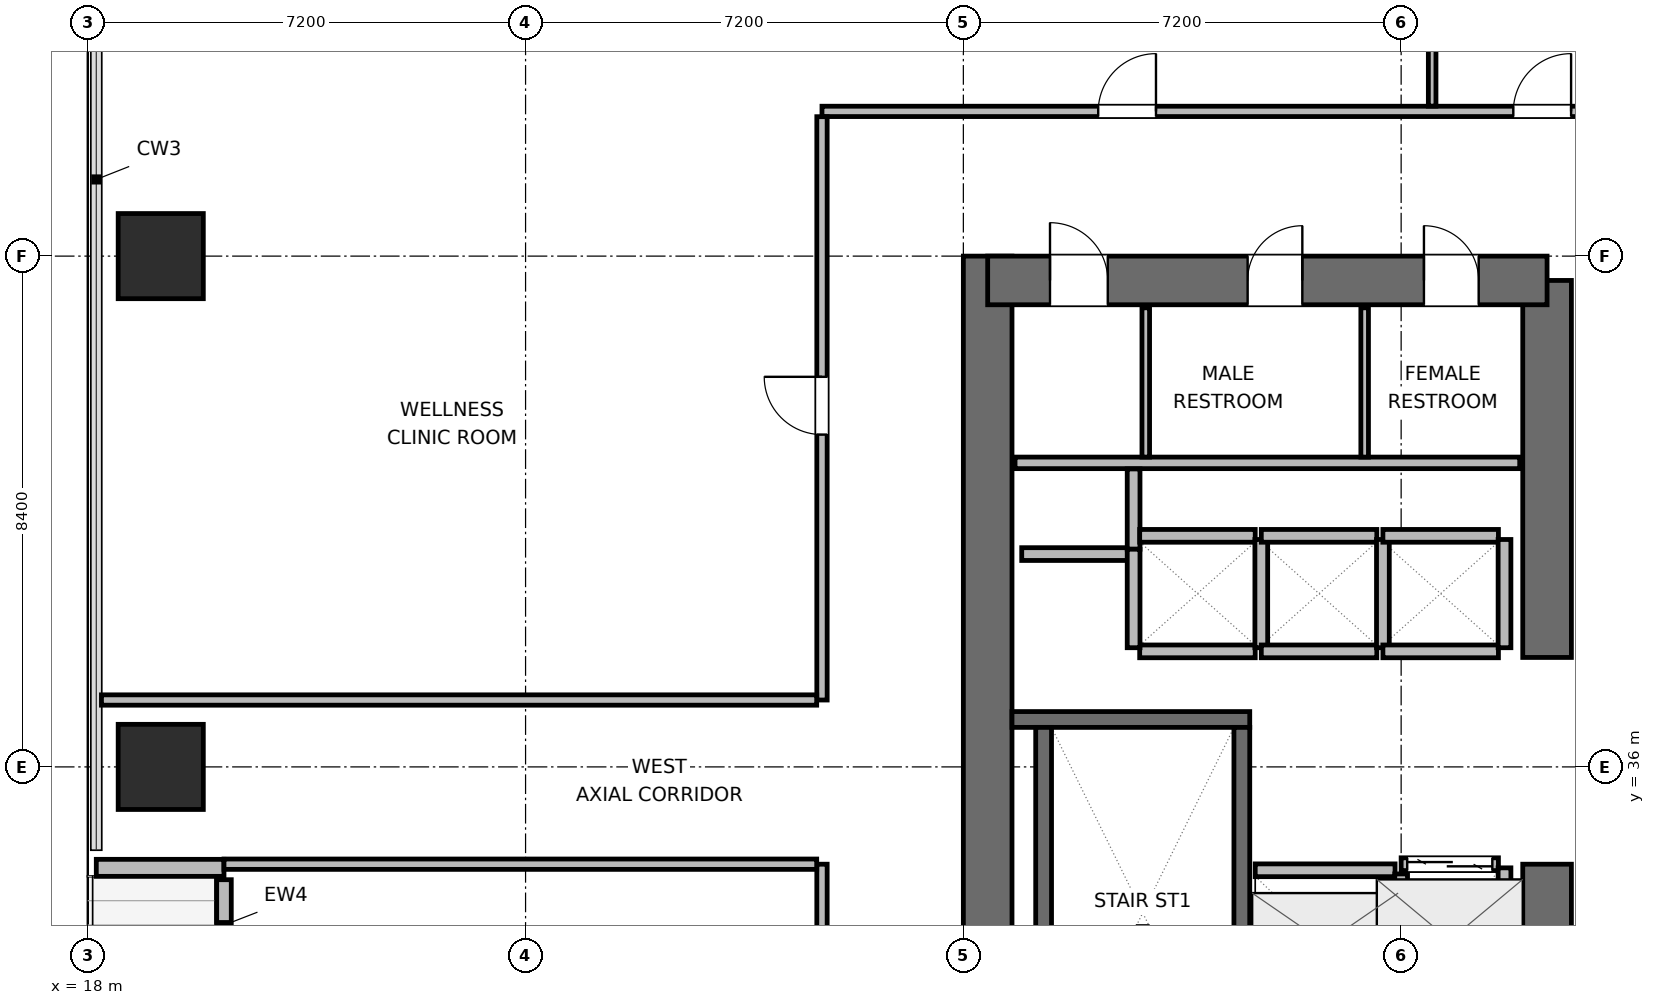
"""IFC4 building model, lengths in metres.
Left out: names, types, materials, properties, quantities, classifications, styles, units other than length and angle.
Written with IfcOpenShell. Run it as: python <this file> out.ifc"""

import sys

from ifc_helpers import new_model, si_unit, direction, frame, frame_2d, origin, origin_2d, place, context, subcontext, project, spatial, rectangle, extrude, element, fill, save


model = new_model("IFC4")
c1 = context("Model", 3, precision=1e-05, world=origin(), true_north=direction((0.0, 1.0)))
c2 = subcontext(c1, "Body", "Model", "MODEL_VIEW")
j1 = project(units=[si_unit("LENGTHUNIT", "METRE"), si_unit("PLANEANGLEUNIT", "RADIAN")], contexts=[c1])
p1 = place(None, origin())
s1 = spatial("IfcSite", under=j1, at=p1, CompositionType="ELEMENT")
p2 = place(p1, origin())
s2 = spatial("IfcBuilding", under=s1, at=p2, CompositionType="ELEMENT")
p3 = place(p2, frame((0.0, 0.0, 150.6)))
s3 = spatial("IfcBuildingStorey", under=s2, at=p3, CompositionType="ELEMENT", Elevation=150.6)
p4 = place(p3, frame((32.8, 27.6, 0.0), z_axis=(0.0, 0.0, 1.0), x_axis=(0.0, 1.0, 0.0)))
e1 = element("IfcWall", 1, at=p4, inside=s3, PredefinedType="SHEAR", context=c2, shape_type="SweptSolid", body=[
    extrude(rectangle(XDim=16.8, YDim=0.8, at=frame_2d((8.4, 0.0))), origin(), (0.0, 0.0, 1.0), 3.9),
])
p5 = place(p3, frame((42.0, 28.0, 0.0), z_axis=(0.0, 0.0, 1.0), x_axis=(0.0, 1.0, 0.0)))
e2 = element("IfcWall", 2, at=p5, inside=s3, PredefinedType="SHEAR", context=c2, shape_type="SweptSolid", body=[
    extrude(rectangle(XDim=6.4, YDim=0.8, at=frame_2d((3.2, 0.0))), origin(), (0.0, 0.0, 1.0), 3.9),
])
p6 = place(p3, frame((42.0, 37.8, 0.0), z_axis=(0.0, 0.0, 1.0), x_axis=(0.0, 1.0, 0.0)))
e3 = element("IfcWall", 3, at=p6, inside=s3, PredefinedType="SHEAR", context=c2, shape_type="SweptSolid", body=[
    extrude(rectangle(XDim=6.2, YDim=0.8, at=frame_2d((3.1, 0.0))), origin(), (0.0, 0.0, 1.0), 3.9),
])
p7 = place(p3, frame((32.8, 44.0, 0.0), z_axis=(0.0, 0.0, 1.0), x_axis=(1.0, 0.0, 0.0)))
e4 = element("IfcWall", 4, at=p7, inside=s3, PredefinedType="SHEAR", context=c2, shape_type="SweptSolid", body=[
    extrude(rectangle(XDim=9.2, YDim=0.8, at=frame_2d((4.6, 0.0))), origin(), (0.0, 0.0, 1.0), 3.9),
])
p8 = place(p7, frame((1.025, 0.0, 0.0)))
e5 = element("IfcOpeningElement", 5, at=p8, cuts=e4, PredefinedType="OPENING", context=c2, shape_type="SweptSolid", body=[
    extrude(rectangle(XDim=0.95, YDim=2.04, at=frame_2d((0.475, 1.02))), frame((0.0, 0.41, 0.0), z_axis=(0.0, -1.0, 0.0), x_axis=(1.0, 0.0, 0.0)), (0.0, 0.0, 1.0), 0.82),
])
p9 = place(p7, frame((4.275, 0.0, 0.0)))
e6 = element("IfcOpeningElement", 6, at=p9, cuts=e4, PredefinedType="OPENING", context=c2, shape_type="SweptSolid", body=[
    extrude(rectangle(XDim=0.9, YDim=2.02, at=frame_2d((0.45, 1.01))), frame((0.0, 0.41, 0.0), z_axis=(0.0, -1.0, 0.0), x_axis=(1.0, 0.0, 0.0)), (0.0, 0.0, 1.0), 0.82),
])
p10 = place(p7, frame((7.175, 0.0, 0.0)))
e7 = element("IfcOpeningElement", 7, at=p10, cuts=e4, PredefinedType="OPENING", context=c2, shape_type="SweptSolid", body=[
    extrude(rectangle(XDim=0.9, YDim=2.02, at=frame_2d((0.45, 1.01))), frame((0.0, 0.41, 0.0), z_axis=(0.0, -1.0, 0.0), x_axis=(1.0, 0.0, 0.0)), (0.0, 0.0, 1.0), 0.82),
])
p11 = place(p3, frame((33.2, 36.78, 0.0), z_axis=(0.0, 0.0, 1.0), x_axis=(1.0, 0.0, 0.0)))
e8 = element("IfcWall", 8, at=p11, inside=s3, PredefinedType="SHEAR", context=c2, shape_type="SweptSolid", body=[
    extrude(rectangle(XDim=3.91, YDim=0.26, at=frame_2d((1.955, 0.0))), origin(), (0.0, 0.0, 1.0), 3.9),
])
p12 = place(p3, frame((33.72, 29.05, 0.0), z_axis=(0.0, 0.0, 1.0), x_axis=(0.0, 1.0, 0.0)))
e9 = element("IfcWall", 9, at=p12, inside=s3, PredefinedType="SHEAR", context=c2, shape_type="SweptSolid", body=[
    extrude(rectangle(XDim=7.6, YDim=0.26, at=frame_2d((3.8, 0.0))), origin(), (0.0, 0.0, 1.0), 3.9),
])
p13 = place(p3, frame((36.98, 29.05, 0.0), z_axis=(0.0, 0.0, 1.0), x_axis=(0.0, 1.0, 0.0)))
e10 = element("IfcWall", 10, at=p13, inside=s3, PredefinedType="SHEAR", context=c2, shape_type="SweptSolid", body=[
    extrude(rectangle(XDim=7.6, YDim=0.26, at=frame_2d((3.8, 0.0))), origin(), (0.0, 0.0, 1.0), 3.9),
])
p14 = place(p13, frame((0.3, 0.0, 0.0)))
e11 = element("IfcOpeningElement", 11, at=p14, cuts=e10, PredefinedType="OPENING", context=c2, shape_type="SweptSolid", body=[
    extrude(rectangle(XDim=1.0, YDim=2.04, at=frame_2d((0.5, 1.02))), frame((0.0, 0.14, 0.0), z_axis=(0.0, -1.0, 0.0), x_axis=(1.0, 0.0, 0.0)), (0.0, 0.0, 1.0), 0.28),
])
for number, where, z_axis, x_axis in (
    (12, (19.2, 36.0, 0.0), (0.0, 0.0, 1.0), (1.0, 0.0, 0.0)),
    (13, (19.2, 44.4, 0.0), (0.0, 0.0, 1.0), (1.0, 0.0, 0.0)),
):
    element("IfcColumn", number, at=place(p3, frame(where, z_axis=z_axis, x_axis=x_axis)), inside=s3, PredefinedType="COLUMN", context=c2, shape_type="SweptSolid", body=[
        extrude(rectangle(XDim=1.4, YDim=1.4, at=origin_2d()), origin(), (0.0, 0.0, 1.0), 3.9),
    ])
p15 = place(p3, frame((20.24, 29.455, 0.0), z_axis=(0.0, 0.0, 1.0), x_axis=(0.0, 1.0, 0.0)))
e14 = element("IfcWall", 14, at=p15, inside=s3, PredefinedType="SOLIDWALL", context=c2, shape_type="SweptSolid", body=[
    extrude(rectangle(XDim=4.69, YDim=0.24, at=frame_2d((2.345, 0.0))), origin(), (0.0, 0.0, 1.0), 3.248),
])
p16 = place(p15, frame((1.845, 0.0, 0.0)))
e15 = element("IfcOpeningElement", 15, at=p16, cuts=e14, PredefinedType="OPENING", context=c2, shape_type="SweptSolid", body=[
    extrude(rectangle(XDim=1.0, YDim=2.02, at=frame_2d((0.5, 1.01))), frame((0.0, 0.13, 0.0), z_axis=(0.0, -1.0, 0.0), x_axis=(1.0, 0.0, 0.0)), (0.0, 0.0, 1.0), 0.26),
])
p17 = place(p3, frame((20.24, 34.34, 0.0), z_axis=(0.0, 0.0, 1.0), x_axis=(-1.0, 0.0, 0.0)))
e16 = element("IfcWall", 16, at=p17, inside=s3, PredefinedType="SOLIDWALL", context=c2, shape_type="SweptSolid", body=[
    extrude(rectangle(XDim=2.1, YDim=0.28, at=frame_2d((1.05, 0.0))), origin(), (0.0, 0.0, 1.0), 3.116),
])
p18 = place(p3, frame((33.25, 41.0, 0.0), z_axis=(0.0, 0.0, 1.0), x_axis=(1.0, 0.0, 0.0)))
e17 = element("IfcWall", 17, at=p18, inside=s3, PredefinedType="PLUMBINGWALL", context=c2, shape_type="SweptSolid", body=[
    extrude(rectangle(XDim=8.3, YDim=0.19, at=frame_2d((4.15, 0.0))), origin(), (0.0, 0.0, 1.0), 3.68),
])
for number, where, z_axis, x_axis in (
    (18, (35.4, 41.095, 0.0), (0.0, 0.0, 1.0), (0.0, 1.0, 0.0)),
    (19, (39.0, 41.095, 0.0), (0.0, 0.0, 1.0), (0.0, 1.0, 0.0)),
):
    element("IfcWall", number, at=place(p3, frame(where, z_axis=z_axis, x_axis=x_axis)), inside=s3, PredefinedType="PARTITIONING", context=c2, shape_type="SweptSolid", body=[
        extrude(rectangle(XDim=2.455, YDim=0.125, at=frame_2d((1.228, 0.0))), origin(), (0.0, 0.0, 1.0), 3.68),
    ])
p19 = place(p3, frame((33.36, 39.5, 0.0), z_axis=(0.0, 0.0, 1.0), x_axis=(1.0, 0.0, 0.0)))
e20 = element("IfcWall", 20, at=p19, inside=s3, PredefinedType="PARTITIONING", context=c2, shape_type="SweptSolid", body=[
    extrude(rectangle(XDim=1.86, YDim=0.21, at=frame_2d((0.93, 0.0))), origin(), (0.0, 0.0, 1.0), 3.68),
])
p20 = place(p3, frame((35.2, 39.58, 0.0), z_axis=(0.0, 0.0, 1.0), x_axis=(0.0, 1.0, 0.0)))
e21 = element("IfcWall", 21, at=p20, inside=s3, PredefinedType="PARTITIONING", context=c2, shape_type="SweptSolid", body=[
    extrude(rectangle(XDim=1.32, YDim=0.21, at=frame_2d((0.66, 0.0))), origin(), (0.0, 0.0, 1.0), 3.68),
])
p21 = place(p3, frame((37.2, 34.3, 0.0), z_axis=(0.0, 0.0, 1.0), x_axis=(1.0, 0.0, 0.0)))
e22 = element("IfcWall", 22, at=p21, inside=s3, PredefinedType="PARTITIONING", context=c2, shape_type="SweptSolid", body=[
    extrude(rectangle(XDim=2.3, YDim=0.21, at=frame_2d((1.15, 0.0))), origin(), (0.0, 0.0, 1.0), 3.68),
])
p22 = place(p3, frame((39.6, 31.96, 0.0), z_axis=(0.0, 0.0, 1.0), x_axis=(0.0, 1.0, 0.0)))
e23 = element("IfcWall", 23, at=p22, inside=s3, PredefinedType="PARTITIONING", context=c2, shape_type="SweptSolid", body=[
    extrude(rectangle(XDim=2.28, YDim=0.21, at=frame_2d((1.14, 0.0))), origin(), (0.0, 0.0, 1.0), 3.68),
])
p23 = place(p3, frame((39.6, 34.4, 0.0), z_axis=(0.0, 0.0, 1.0), x_axis=(1.0, 0.0, 0.0)))
e24 = element("IfcWall", 24, at=p23, inside=s3, PredefinedType="PARTITIONING", context=c2, shape_type="SweptSolid", body=[
    extrude(rectangle(XDim=1.6, YDim=0.21, at=frame_2d((0.8, 0.0))), origin(), (0.0, 0.0, 1.0), 3.68),
])
p24 = place(p23, frame((0.1, 0.0, 0.0)))
e25 = element("IfcOpeningElement", 25, at=p24, cuts=e24, PredefinedType="OPENING", context=c2, shape_type="SweptSolid", body=[
    extrude(rectangle(XDim=1.4, YDim=2.06, at=frame_2d((0.7, 1.03))), frame((0.0, 0.115, 0.0), z_axis=(0.0, -1.0, 0.0), x_axis=(1.0, 0.0, 0.0)), (0.0, 0.0, 1.0), 0.23),
])
p25 = place(p3, frame((41.3, 31.96, 0.0), z_axis=(0.0, 0.0, 1.0), x_axis=(0.0, 1.0, 0.0)))
e26 = element("IfcWall", 26, at=p25, inside=s3, PredefinedType="PARTITIONING", context=c2, shape_type="SweptSolid", body=[
    extrude(rectangle(XDim=2.38, YDim=0.21, at=frame_2d((1.19, 0.0))), origin(), (0.0, 0.0, 1.0), 3.68),
])
for number, where, z_axis, x_axis in (
    (27, (35.3, 37.9, 0.0), (0.0, 0.0, 1.0), (1.0, 0.0, 0.0)),
    (28, (35.3, 39.8, 0.0), (0.0, 0.0, 1.0), (1.0, 0.0, 0.0)),
):
    element("IfcWall", number, at=place(p3, frame(where, z_axis=z_axis, x_axis=x_axis)), inside=s3, PredefinedType="PARTITIONING", context=c2, shape_type="SweptSolid", body=[
        extrude(rectangle(XDim=1.9, YDim=0.21, at=frame_2d((0.95, 0.0))), origin(), (0.0, 0.0, 1.0), 3.68),
    ])
p26 = place(p3, frame((35.2, 37.96, 0.0), z_axis=(0.0, 0.0, 1.0), x_axis=(0.0, 1.0, 0.0)))
e29 = element("IfcWall", 29, at=p26, inside=s3, PredefinedType="PARTITIONING", context=c2, shape_type="SweptSolid", body=[
    extrude(rectangle(XDim=1.62, YDim=0.21, at=frame_2d((0.81, 0.0))), origin(), (0.0, 0.0, 1.0), 3.68),
])
p27 = place(p3, frame((37.3, 37.96, 0.0), z_axis=(0.0, 0.0, 1.0), x_axis=(0.0, 1.0, 0.0)))
e30 = element("IfcWall", 30, at=p27, inside=s3, PredefinedType="PARTITIONING", context=c2, shape_type="SweptSolid", body=[
    extrude(rectangle(XDim=1.78, YDim=0.21, at=frame_2d((0.89, 0.0))), origin(), (0.0, 0.0, 1.0), 3.68),
])
for number, where, z_axis, x_axis in (
    (31, (37.3, 37.9, 0.0), (0.0, 0.0, 1.0), (1.0, 0.0, 0.0)),
    (32, (37.3, 39.8, 0.0), (0.0, 0.0, 1.0), (1.0, 0.0, 0.0)),
):
    element("IfcWall", number, at=place(p3, frame(where, z_axis=z_axis, x_axis=x_axis)), inside=s3, PredefinedType="PARTITIONING", context=c2, shape_type="SweptSolid", body=[
        extrude(rectangle(XDim=1.9, YDim=0.21, at=frame_2d((0.95, 0.0))), origin(), (0.0, 0.0, 1.0), 3.68),
    ])
p28 = place(p3, frame((39.3, 37.96, 0.0), z_axis=(0.0, 0.0, 1.0), x_axis=(0.0, 1.0, 0.0)))
e33 = element("IfcWall", 33, at=p28, inside=s3, PredefinedType="PARTITIONING", context=c2, shape_type="SweptSolid", body=[
    extrude(rectangle(XDim=1.78, YDim=0.21, at=frame_2d((0.89, 0.0))), origin(), (0.0, 0.0, 1.0), 3.68),
])
for number, where, z_axis, x_axis in (
    (34, (39.3, 37.9, 0.0), (0.0, 0.0, 1.0), (1.0, 0.0, 0.0)),
    (35, (39.3, 39.8, 0.0), (0.0, 0.0, 1.0), (1.0, 0.0, 0.0)),
):
    element("IfcWall", number, at=place(p3, frame(where, z_axis=z_axis, x_axis=x_axis)), inside=s3, PredefinedType="PARTITIONING", context=c2, shape_type="SweptSolid", body=[
        extrude(rectangle(XDim=1.9, YDim=0.21, at=frame_2d((0.95, 0.0))), origin(), (0.0, 0.0, 1.0), 3.68),
    ])
p29 = place(p3, frame((41.3, 37.96, 0.0), z_axis=(0.0, 0.0, 1.0), x_axis=(0.0, 1.0, 0.0)))
e36 = element("IfcWall", 36, at=p29, inside=s3, PredefinedType="PARTITIONING", context=c2, shape_type="SweptSolid", body=[
    extrude(rectangle(XDim=1.78, YDim=0.21, at=frame_2d((0.89, 0.0))), origin(), (0.0, 0.0, 1.0), 3.68),
])
p30 = place(p3, frame((30.075, 46.78, 0.0), z_axis=(0.0, 0.0, 1.0), x_axis=(1.0, 0.0, 0.0)))
e37 = element("IfcWall", 37, at=p30, inside=s3, PredefinedType="PARTITIONING", context=c2, shape_type="SweptSolid", body=[
    extrude(rectangle(XDim=33.525, YDim=0.17, at=frame_2d((16.763, 0.0))), origin(), (0.0, 0.0, 1.0), 3.68),
])
p31 = place(p30, frame((4.543, 0.0, 0.0)))
e38 = element("IfcOpeningElement", 38, at=p31, cuts=e37, PredefinedType="OPENING", context=c2, shape_type="SweptSolid", body=[
    extrude(rectangle(XDim=0.95, YDim=2.04, at=frame_2d((0.475, 1.02))), frame((0.0, 0.095, 0.0), z_axis=(0.0, -1.0, 0.0), x_axis=(1.0, 0.0, 0.0)), (0.0, 0.0, 1.0), 0.19),
])
p32 = place(p30, frame((11.37, 0.0, 0.0)))
e39 = element("IfcOpeningElement", 39, at=p32, cuts=e37, PredefinedType="OPENING", context=c2, shape_type="SweptSolid", body=[
    extrude(rectangle(XDim=0.95, YDim=2.04, at=frame_2d((0.475, 1.02))), frame((0.0, 0.095, 0.0), z_axis=(0.0, -1.0, 0.0), x_axis=(1.0, 0.0, 0.0)), (0.0, 0.0, 1.0), 0.19),
])
p33 = place(p30, frame((18.905, 0.0, 0.0)))
e40 = element("IfcOpeningElement", 40, at=p33, cuts=e37, PredefinedType="OPENING", context=c2, shape_type="SweptSolid", body=[
    extrude(rectangle(XDim=0.95, YDim=2.04, at=frame_2d((0.475, 1.02))), frame((0.0, 0.095, 0.0), z_axis=(0.0, -1.0, 0.0), x_axis=(1.0, 0.0, 0.0)), (0.0, 0.0, 1.0), 0.19),
])
p34 = place(p30, frame((27.74, 0.0, 0.0)))
e41 = element("IfcOpeningElement", 41, at=p34, cuts=e37, PredefinedType="OPENING", context=c2, shape_type="SweptSolid", body=[
    extrude(rectangle(XDim=0.95, YDim=2.04, at=frame_2d((0.475, 1.02))), frame((0.0, 0.095, 0.0), z_axis=(0.0, -1.0, 0.0), x_axis=(1.0, 0.0, 0.0)), (0.0, 0.0, 1.0), 0.19),
])
p35 = place(p30, frame((31.95, 0.0, 0.0)))
e42 = element("IfcOpeningElement", 42, at=p35, cuts=e37, PredefinedType="OPENING", context=c2, shape_type="SweptSolid", body=[
    extrude(rectangle(XDim=0.95, YDim=2.04, at=frame_2d((0.475, 1.02))), frame((0.0, 0.095, 0.0), z_axis=(0.0, -1.0, 0.0), x_axis=(1.0, 0.0, 0.0)), (0.0, 0.0, 1.0), 0.19),
])
p36 = place(p3, frame((30.075, 25.307, 0.0), z_axis=(0.0, 0.0, 1.0), x_axis=(0.0, 1.0, 0.0)))
e43 = element("IfcWall", 43, at=p36, inside=s3, PredefinedType="PARTITIONING", context=c2, shape_type="SweptSolid", body=[
    extrude(rectangle(XDim=9.093, YDim=0.17, at=frame_2d((4.546, 0.0))), origin(), (0.0, 0.0, 1.0), 3.68),
])
p37 = place(p36, frame((4.028, 0.0, 0.0)))
e44 = element("IfcOpeningElement", 44, at=p37, cuts=e43, PredefinedType="OPENING", context=c2, shape_type="SweptSolid", body=[
    extrude(rectangle(XDim=0.95, YDim=2.04, at=frame_2d((0.475, 1.02))), frame((0.0, 0.095, 0.0), z_axis=(0.0, -1.0, 0.0), x_axis=(1.0, 0.0, 0.0)), (0.0, 0.0, 1.0), 0.19),
])
p38 = place(p3, frame((30.075, 37.1, 0.0), z_axis=(0.0, 0.0, 1.0), x_axis=(0.0, 1.0, 0.0)))
e45 = element("IfcWall", 45, at=p38, inside=s3, PredefinedType="PARTITIONING", context=c2, shape_type="SweptSolid", body=[
    extrude(rectangle(XDim=9.593, YDim=0.17, at=frame_2d((4.796, 0.0))), origin(), (0.0, 0.0, 1.0), 3.68),
])
p39 = place(p38, frame((4.365, 0.0, 0.0)))
e46 = element("IfcOpeningElement", 46, at=p39, cuts=e45, PredefinedType="OPENING", context=c2, shape_type="SweptSolid", body=[
    extrude(rectangle(XDim=0.95, YDim=2.04, at=frame_2d((0.475, 1.02))), frame((0.0, 0.095, 0.0), z_axis=(0.0, -1.0, 0.0), x_axis=(1.0, 0.0, 0.0)), (0.0, 0.0, 1.0), 0.19),
])
p40 = place(p3, frame((40.11, 46.867, 0.0), z_axis=(0.0, 0.0, 1.0), x_axis=(0.0, 1.0, 0.0)))
e47 = element("IfcWall", 47, at=p40, inside=s3, PredefinedType="PARTITIONING", context=c2, shape_type="SweptSolid", body=[
    extrude(rectangle(XDim=15.298, YDim=0.125, at=frame_2d((7.649, 0.0))), origin(), (0.0, 0.0, 1.0), 3.043),
])
p41 = place(p3, frame((20.24, 34.4, 0.0), z_axis=(0.0, 0.0, 1.0), x_axis=(1.0, 0.0, 0.0)))
e48 = element("IfcWall", 48, at=p41, inside=s3, PredefinedType="PARTITIONING", context=c2, shape_type="SweptSolid", body=[
    extrude(rectangle(XDim=9.748, YDim=0.17, at=frame_2d((4.874, 0.0))), origin(), (0.0, 0.0, 1.0), 3.68),
])
p42 = place(p3, frame((18.225, 37.1, 0.0), z_axis=(0.0, 0.0, 1.0), x_axis=(1.0, 0.0, 0.0)))
e49 = element("IfcWall", 49, at=p42, inside=s3, PredefinedType="PARTITIONING", context=c2, shape_type="SweptSolid", body=[
    extrude(rectangle(XDim=11.763, YDim=0.17, at=frame_2d((5.881, 0.0))), origin(), (0.0, 0.0, 1.0), 3.68),
])
p43 = place(p24, origin())
e50 = element("IfcDoor", 50, at=p43, inside=s3, OperationType="DOUBLE_DOOR_SLIDING", PredefinedType="DOOR", context=c2, shape_type="SweptSolid", body=[
    extrude(rectangle(XDim=1.4, YDim=2.06, at=frame_2d((0.7, 1.03))), frame((0.0, 0.025, 0.0), z_axis=(0.0, -1.0, 0.0), x_axis=(1.0, 0.0, 0.0)), (0.0, 0.0, 1.0), 0.05),
])
fill(e25, e50)
p44 = place(p8, origin())
e51 = element("IfcDoor", 51, at=p44, inside=s3, OperationType="SINGLE_SWING_LEFT", PredefinedType="DOOR", context=c2, shape_type="SweptSolid", body=[
    extrude(rectangle(XDim=0.95, YDim=2.04, at=frame_2d((0.475, 1.02))), frame((0.0, 0.025, 0.0), z_axis=(0.0, -1.0, 0.0), x_axis=(1.0, 0.0, 0.0)), (0.0, 0.0, 1.0), 0.05),
])
fill(e5, e51)
p45 = place(p9, origin())
e52 = element("IfcDoor", 52, at=p45, inside=s3, OperationType="SINGLE_SWING_RIGHT", PredefinedType="DOOR", context=c2, shape_type="SweptSolid", body=[
    extrude(rectangle(XDim=0.9, YDim=2.02, at=frame_2d((0.45, 1.01))), frame((0.0, 0.025, 0.0), z_axis=(0.0, -1.0, 0.0), x_axis=(1.0, 0.0, 0.0)), (0.0, 0.0, 1.0), 0.05),
])
fill(e6, e52)
p46 = place(p10, origin())
e53 = element("IfcDoor", 53, at=p46, inside=s3, OperationType="SINGLE_SWING_LEFT", PredefinedType="DOOR", context=c2, shape_type="SweptSolid", body=[
    extrude(rectangle(XDim=0.9, YDim=2.02, at=frame_2d((0.45, 1.01))), frame((0.0, 0.025, 0.0), z_axis=(0.0, -1.0, 0.0), x_axis=(1.0, 0.0, 0.0)), (0.0, 0.0, 1.0), 0.05),
])
fill(e7, e53)
p47 = place(p31, origin())
e54 = element("IfcDoor", 54, at=p47, inside=s3, OperationType="SINGLE_SWING_RIGHT", PredefinedType="DOOR", context=c2, shape_type="SweptSolid", body=[
    extrude(rectangle(XDim=0.95, YDim=2.04, at=frame_2d((0.475, 1.02))), frame((0.0, 0.025, 0.0), z_axis=(0.0, -1.0, 0.0), x_axis=(1.0, 0.0, 0.0)), (0.0, 0.0, 1.0), 0.05),
])
fill(e38, e54)
p48 = place(p32, origin())
e55 = element("IfcDoor", 55, at=p48, inside=s3, OperationType="SINGLE_SWING_RIGHT", PredefinedType="DOOR", context=c2, shape_type="SweptSolid", body=[
    extrude(rectangle(XDim=0.95, YDim=2.04, at=frame_2d((0.475, 1.02))), frame((0.0, 0.025, 0.0), z_axis=(0.0, -1.0, 0.0), x_axis=(1.0, 0.0, 0.0)), (0.0, 0.0, 1.0), 0.05),
])
fill(e39, e55)
p49 = place(p39, origin())
e56 = element("IfcDoor", 56, at=p49, inside=s3, OperationType="SINGLE_SWING_RIGHT", PredefinedType="DOOR", context=c2, shape_type="SweptSolid", body=[
    extrude(rectangle(XDim=0.95, YDim=2.04, at=frame_2d((0.475, 1.02))), frame((0.0, 0.025, 0.0), z_axis=(0.0, -1.0, 0.0), x_axis=(1.0, 0.0, 0.0)), (0.0, 0.0, 1.0), 0.05),
])
fill(e46, e56)
save(model, sys.argv[1])
